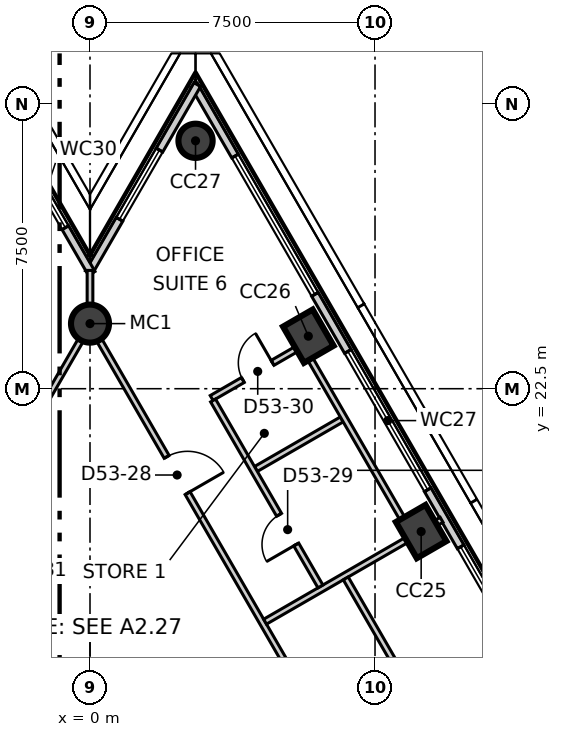
"""IFC4 building model, lengths in metres.
Left out: names, types, materials, properties, quantities, classifications, styles, units other than length and angle.
Written with IfcOpenShell. Run it as: python <this file> out.ifc"""

import sys

from ifc_helpers import new_model, si_unit, direction, frame, frame_2d, origin, origin_2d, place, context, subcontext, project, spatial, rectangle, circle, extrude, element, fill, save


model = new_model("IFC4")
c1 = context("Model", 3, precision=1e-05, world=origin(), true_north=direction((0.0, 1.0)))
c2 = subcontext(c1, "Body", "Model", "MODEL_VIEW")
j1 = project(units=[si_unit("LENGTHUNIT", "METRE"), si_unit("PLANEANGLEUNIT", "RADIAN")], contexts=[c1])
p1 = place(None, origin())
s1 = spatial("IfcSite", under=j1, at=p1, CompositionType="ELEMENT")
p2 = place(p1, origin())
s2 = spatial("IfcBuilding", under=s1, at=p2, CompositionType="ELEMENT")
p3 = place(p2, frame((0.0, 0.0, 227.3)))
s3 = spatial("IfcBuildingStorey", under=s2, at=p3, CompositionType="ELEMENT", Elevation=227.3)
for number, where, z_axis, x_axis in (
    (1, (8.714, 18.741, -0.3), (0.0, 0.0, 1.0), (-0.5, 0.866, 0.0)),
    (2, (5.745, 23.882, -0.3), (0.0, 0.0, 1.0), (-0.5, 0.866, 0.0)),
):
    element("IfcColumn", number, at=place(p3, frame(where, z_axis=z_axis, x_axis=x_axis)), inside=s3, PredefinedType="COLUMN", context=c2, shape_type="SweptSolid", body=[
        extrude(rectangle(XDim=1.1, YDim=0.9, at=origin_2d()), origin(), (0.0, 0.0, 1.0), 4.0),
    ])
p4 = place(p3, frame((2.777, 29.023, -0.3), z_axis=(0.0, 0.0, 1.0), x_axis=(-0.5, 0.866025403784, 0.0)))
e3 = element("IfcColumn", 3, at=p4, inside=s3, PredefinedType="COLUMN", context=c2, shape_type="SweptSolid", body=[
    extrude(circle(Radius=0.45, at=origin_2d()), origin(), (0.0, 0.0, 1.0), 4.0),
])
p5 = place(p3, frame((0.0, 24.213, -0.3), z_axis=(0.0, 0.0, 1.0), x_axis=(1.0, 0.0, 0.0)))
e4 = element("IfcColumn", 4, at=p5, inside=s3, PredefinedType="COLUMN", context=c2, shape_type="SweptSolid", body=[
    extrude(circle(Radius=0.5, at=origin_2d()), origin(), (0.0, 0.0, 1.0), 4.0),
])
p6 = place(p3, frame((27.782, -12.884, 0.0), z_axis=(0.0, 0.0, 1.0), x_axis=(-0.500023345841, 0.866011924637, 0.0)))
e5 = element("IfcWall", 5, at=p6, inside=s3, PredefinedType="ELEMENTEDWALL", context=c2, shape_type="SweptSolid", body=[
    extrude(rectangle(XDim=50.078, YDim=0.2, at=frame_2d((25.039, 0.0))), origin(), (0.0, 0.0, 1.0), 3.7),
])
p7 = place(p6, frame((2.171, 0.0, 0.9)))
e6 = element("IfcOpeningElement", 6, at=p7, cuts=e5, PredefinedType="OPENING", context=c2, shape_type="SweptSolid", body=[
    extrude(rectangle(XDim=4.2, YDim=2.5, at=frame_2d((2.1, 1.25))), frame((0.0, 0.11, 0.0), z_axis=(0.0, -1.0, 0.0), x_axis=(1.0, 0.0, 0.0)), (0.0, 0.0, 1.0), 0.22),
])
p8 = place(p6, frame((8.108, 0.0, 0.9)))
e7 = element("IfcOpeningElement", 7, at=p8, cuts=e5, PredefinedType="OPENING", context=c2, shape_type="SweptSolid", body=[
    extrude(rectangle(XDim=4.2, YDim=2.5, at=frame_2d((2.1, 1.25))), frame((0.0, 0.11, 0.0), z_axis=(0.0, -1.0, 0.0), x_axis=(1.0, 0.0, 0.0)), (0.0, 0.0, 1.0), 0.22),
])
p9 = place(p6, frame((14.044, 0.0, 0.9)))
e8 = element("IfcOpeningElement", 8, at=p9, cuts=e5, PredefinedType="OPENING", context=c2, shape_type="SweptSolid", body=[
    extrude(rectangle(XDim=4.2, YDim=2.5, at=frame_2d((2.1, 1.25))), frame((0.0, 0.11, 0.0), z_axis=(0.0, -1.0, 0.0), x_axis=(1.0, 0.0, 0.0)), (0.0, 0.0, 1.0), 0.22),
])
p10 = place(p6, frame((19.981, 0.0, 0.9)))
e9 = element("IfcOpeningElement", 9, at=p10, cuts=e5, PredefinedType="OPENING", context=c2, shape_type="SweptSolid", body=[
    extrude(rectangle(XDim=4.2, YDim=2.5, at=frame_2d((2.1, 1.25))), frame((0.0, 0.11, 0.0), z_axis=(0.0, -1.0, 0.0), x_axis=(1.0, 0.0, 0.0)), (0.0, 0.0, 1.0), 0.22),
])
p11 = place(p6, frame((25.917, 0.0, 0.9)))
e10 = element("IfcOpeningElement", 10, at=p11, cuts=e5, PredefinedType="OPENING", context=c2, shape_type="SweptSolid", body=[
    extrude(rectangle(XDim=4.2, YDim=2.5, at=frame_2d((2.1, 1.25))), frame((0.0, 0.11, 0.0), z_axis=(0.0, -1.0, 0.0), x_axis=(1.0, 0.0, 0.0)), (0.0, 0.0, 1.0), 0.22),
])
p12 = place(p6, frame((31.854, 0.0, 0.9)))
e11 = element("IfcOpeningElement", 11, at=p12, cuts=e5, PredefinedType="OPENING", context=c2, shape_type="SweptSolid", body=[
    extrude(rectangle(XDim=4.2, YDim=2.5, at=frame_2d((2.1, 1.25))), frame((0.0, 0.11, 0.0), z_axis=(0.0, -1.0, 0.0), x_axis=(1.0, 0.0, 0.0)), (0.0, 0.0, 1.0), 0.22),
])
p13 = place(p6, frame((37.79, 0.0, 0.9)))
e12 = element("IfcOpeningElement", 12, at=p13, cuts=e5, PredefinedType="OPENING", context=c2, shape_type="SweptSolid", body=[
    extrude(rectangle(XDim=4.2, YDim=2.5, at=frame_2d((2.1, 1.25))), frame((0.0, 0.11, 0.0), z_axis=(0.0, -1.0, 0.0), x_axis=(1.0, 0.0, 0.0)), (0.0, 0.0, 1.0), 0.22),
])
p14 = place(p6, frame((43.727, 0.0, 0.9)))
e13 = element("IfcOpeningElement", 13, at=p14, cuts=e5, PredefinedType="OPENING", context=c2, shape_type="SweptSolid", body=[
    extrude(rectangle(XDim=4.2, YDim=2.5, at=frame_2d((2.1, 1.25))), frame((0.0, 0.11, 0.0), z_axis=(0.0, -1.0, 0.0), x_axis=(1.0, 0.0, 0.0)), (0.0, 0.0, 1.0), 0.22),
])
p15 = place(p3, frame((2.822, 30.501, 0.0), z_axis=(0.0, 0.0, 1.0), x_axis=(-0.49995298266, -0.866052547557, 0.0)))
e14 = element("IfcWall", 14, at=p15, inside=s3, PredefinedType="ELEMENTEDWALL", context=c2, shape_type="SweptSolid", body=[
    extrude(rectangle(XDim=5.714, YDim=0.2, at=frame_2d((2.857, 0.0))), origin(), (0.0, 0.0, 1.0), 3.7),
])
p16 = place(p15, frame((1.99, 0.0, 0.9)))
e15 = element("IfcOpeningElement", 15, at=p16, cuts=e14, PredefinedType="OPENING", context=c2, shape_type="SweptSolid", body=[
    extrude(rectangle(XDim=2.1, YDim=2.5, at=frame_2d((1.05, 1.25))), frame((0.0, 0.11, 0.0), z_axis=(0.0, -1.0, 0.0), x_axis=(1.0, 0.0, 0.0)), (0.0, 0.0, 1.0), 0.22),
])
p17 = place(p3, frame((0.045, 25.535, 0.0), z_axis=(0.0, 0.0, 1.0), x_axis=(-0.49995298266, 0.866052547557, 0.0)))
e16 = element("IfcWall", 16, at=p17, inside=s3, PredefinedType="ELEMENTEDWALL", context=c2, shape_type="SweptSolid", body=[
    extrude(rectangle(XDim=5.714, YDim=0.2, at=frame_2d((2.857, 0.0))), origin(), (0.0, 0.0, 1.0), 3.7),
])
p18 = place(p17, frame((1.39, 0.0, 0.9)))
e17 = element("IfcOpeningElement", 17, at=p18, cuts=e16, PredefinedType="OPENING", context=c2, shape_type="SweptSolid", body=[
    extrude(rectangle(XDim=2.1, YDim=2.5, at=frame_2d((1.05, 1.25))), frame((0.0, 0.11, 0.0), z_axis=(0.0, -1.0, 0.0), x_axis=(1.0, 0.0, 0.0)), (0.0, 0.0, 1.0), 0.22),
])
p19 = place(p3, frame((-20.882, -11.969, 0.0), z_axis=(0.0, 0.0, 1.0), x_axis=(0.499998738735, 0.866026131975, 0.0)))
e18 = element("IfcWall", 18, at=p19, inside=s3, PredefinedType="PARTITIONING", context=c2, shape_type="SweptSolid", body=[
    extrude(rectangle(XDim=41.764, YDim=0.15, at=frame_2d((20.882, 0.0))), origin(), (0.0, 0.0, 1.0), 3.7),
])
p20 = place(p19, frame((33.714, 0.0, 0.0)))
e19 = element("IfcOpeningElement", 19, at=p20, cuts=e18, PredefinedType="OPENING", context=c2, shape_type="SweptSolid", body=[
    extrude(rectangle(XDim=1.1, YDim=2.1, at=frame_2d((0.55, 1.05))), frame((0.0, 0.085, 0.0), z_axis=(0.0, -1.0, 0.0), x_axis=(1.0, 0.0, 0.0)), (0.0, 0.0, 1.0), 0.17),
])
p21 = place(p19, frame((23.293, 0.0, 0.0)))
e20 = element("IfcOpeningElement", 20, at=p21, cuts=e18, PredefinedType="OPENING", context=c2, shape_type="SweptSolid", body=[
    extrude(rectangle(XDim=1.0, YDim=2.1, at=frame_2d((0.5, 1.05))), frame((0.0, 0.085, 0.0), z_axis=(0.0, -1.0, 0.0), x_axis=(1.0, 0.0, 0.0)), (0.0, 0.0, 1.0), 0.17),
])
p22 = place(p19, frame((13.356, 0.0, 0.0)))
e21 = element("IfcOpeningElement", 21, at=p22, cuts=e18, PredefinedType="OPENING", context=c2, shape_type="SweptSolid", body=[
    extrude(rectangle(XDim=1.1, YDim=2.1, at=frame_2d((0.55, 1.05))), frame((0.0, 0.085, 0.0), z_axis=(0.0, -1.0, 0.0), x_axis=(1.0, 0.0, 0.0)), (0.0, 0.0, 1.0), 0.17),
])
p23 = place(p19, frame((18.556, 0.0, 0.0)))
e22 = element("IfcOpeningElement", 22, at=p23, cuts=e18, PredefinedType="OPENING", context=c2, shape_type="SweptSolid", body=[
    extrude(rectangle(XDim=0.9, YDim=2.1, at=frame_2d((0.45, 1.05))), frame((0.0, 0.085, 0.0), z_axis=(0.0, -1.0, 0.0), x_axis=(1.0, 0.0, 0.0)), (0.0, 0.0, 1.0), 0.17),
])
p24 = place(p19, frame((15.556, 0.0, 0.0)))
e23 = element("IfcOpeningElement", 23, at=p24, cuts=e18, PredefinedType="OPENING", context=c2, shape_type="SweptSolid", body=[
    extrude(rectangle(XDim=0.9, YDim=2.1, at=frame_2d((0.45, 1.05))), frame((0.0, 0.085, 0.0), z_axis=(0.0, -1.0, 0.0), x_axis=(1.0, 0.0, 0.0)), (0.0, 0.0, 1.0), 0.17),
])
p25 = place(p19, frame((3.883, 0.0, 0.0)))
e24 = element("IfcOpeningElement", 24, at=p25, cuts=e18, PredefinedType="OPENING", context=c2, shape_type="SweptSolid", body=[
    extrude(rectangle(XDim=1.1, YDim=2.1, at=frame_2d((0.55, 1.05))), frame((0.0, 0.085, 0.0), z_axis=(0.0, -1.0, 0.0), x_axis=(1.0, 0.0, 0.0)), (0.0, 0.0, 1.0), 0.17),
])
p26 = place(p3, frame((0.0, 24.35, 0.0), z_axis=(0.0, 0.0, 1.0), x_axis=(0.0, 1.0, 0.0)))
e25 = element("IfcWall", 25, at=p26, inside=s3, PredefinedType="PARTITIONING", context=c2, shape_type="SweptSolid", body=[
    extrude(rectangle(XDim=1.263, YDim=0.15, at=frame_2d((0.631, 0.0))), origin(), (0.0, 0.0, 1.0), 3.7),
])
p27 = place(p3, frame((0.075, 24.07, 0.0), z_axis=(0.0, 0.0, 1.0), x_axis=(0.49999939571, -0.866025752671, 0.0)))
e26 = element("IfcWall", 26, at=p27, inside=s3, PredefinedType="PARTITIONING", context=c2, shape_type="SweptSolid", body=[
    extrude(rectangle(XDim=41.614, YDim=0.15, at=frame_2d((20.807, 0.0))), origin(), (0.0, 0.0, 1.0), 3.7),
])
p28 = place(p27, frame((36.714, 0.0, 0.0)))
e27 = element("IfcOpeningElement", 27, at=p28, cuts=e26, PredefinedType="OPENING", context=c2, shape_type="SweptSolid", body=[
    extrude(rectangle(XDim=1.1, YDim=2.1, at=frame_2d((0.55, 1.05))), frame((0.0, 0.085, 0.0), z_axis=(0.0, -1.0, 0.0), x_axis=(1.0, 0.0, 0.0)), (0.0, 0.0, 1.0), 0.17),
])
p29 = place(p27, frame((21.831, 0.0, 0.0)))
e28 = element("IfcOpeningElement", 28, at=p29, cuts=e26, PredefinedType="OPENING", context=c2, shape_type="SweptSolid", body=[
    extrude(rectangle(XDim=1.1, YDim=2.1, at=frame_2d((0.55, 1.05))), frame((0.0, 0.085, 0.0), z_axis=(0.0, -1.0, 0.0), x_axis=(1.0, 0.0, 0.0)), (0.0, 0.0, 1.0), 0.17),
])
p30 = place(p27, frame((30.631, 0.0, 0.0)))
e29 = element("IfcOpeningElement", 29, at=p30, cuts=e26, PredefinedType="OPENING", context=c2, shape_type="SweptSolid", body=[
    extrude(rectangle(XDim=0.9, YDim=2.1, at=frame_2d((0.45, 1.05))), frame((0.0, 0.085, 0.0), z_axis=(0.0, -1.0, 0.0), x_axis=(1.0, 0.0, 0.0)), (0.0, 0.0, 1.0), 0.17),
])
p31 = place(p27, frame((27.431, 0.0, 0.0)))
e30 = element("IfcOpeningElement", 30, at=p31, cuts=e26, PredefinedType="OPENING", context=c2, shape_type="SweptSolid", body=[
    extrude(rectangle(XDim=0.9, YDim=2.1, at=frame_2d((0.45, 1.05))), frame((0.0, 0.085, 0.0), z_axis=(0.0, -1.0, 0.0), x_axis=(1.0, 0.0, 0.0)), (0.0, 0.0, 1.0), 0.17),
])
p32 = place(p27, frame((24.631, 0.0, 0.0)))
e31 = element("IfcOpeningElement", 31, at=p32, cuts=e26, PredefinedType="OPENING", context=c2, shape_type="SweptSolid", body=[
    extrude(rectangle(XDim=1.0, YDim=2.1, at=frame_2d((0.5, 1.05))), frame((0.0, 0.085, 0.0), z_axis=(0.0, -1.0, 0.0), x_axis=(1.0, 0.0, 0.0)), (0.0, 0.0, 1.0), 0.17),
])
p33 = place(p27, frame((14.358, 0.0, 0.0)))
e32 = element("IfcOpeningElement", 32, at=p33, cuts=e26, PredefinedType="OPENING", context=c2, shape_type="SweptSolid", body=[
    extrude(rectangle(XDim=1.1, YDim=2.1, at=frame_2d((0.55, 1.05))), frame((0.0, 0.085, 0.0), z_axis=(0.0, -1.0, 0.0), x_axis=(1.0, 0.0, 0.0)), (0.0, 0.0, 1.0), 0.17),
])
p34 = place(p27, frame((3.885, 0.0, 0.0)))
e33 = element("IfcOpeningElement", 33, at=p34, cuts=e26, PredefinedType="OPENING", context=c2, shape_type="SweptSolid", body=[
    extrude(rectangle(XDim=1.1, YDim=2.1, at=frame_2d((0.55, 1.05))), frame((0.0, 0.085, 0.0), z_axis=(0.0, -1.0, 0.0), x_axis=(1.0, 0.0, 0.0)), (0.0, 0.0, 1.0), 0.17),
])
p35 = place(p3, frame((4.607, 16.37, 0.0), z_axis=(0.0, 0.0, 1.0), x_axis=(0.866052151752, 0.499953668299, 0.0)))
e34 = element("IfcWall", 34, at=p35, inside=s3, PredefinedType="PARTITIONING", context=c2, shape_type="SweptSolid", body=[
    extrude(rectangle(XDim=5.362, YDim=0.15, at=frame_2d((2.681, 0.0))), origin(), (0.0, 0.0, 1.0), 3.7),
])
p36 = place(p3, frame((4.366, 20.388, 0.0), z_axis=(0.0, 0.0, 1.0), x_axis=(0.8660749285, 0.499914210863, 0.0)))
e35 = element("IfcWall", 35, at=p36, inside=s3, PredefinedType="PARTITIONING", context=c2, shape_type="SweptSolid", body=[
    extrude(rectangle(XDim=2.608, YDim=0.15, at=frame_2d((1.304, 0.0))), origin(), (0.0, 0.0, 1.0), 3.7),
])
p37 = place(p3, frame((5.59, 23.635, 0.0), z_axis=(0.0, 0.0, 1.0), x_axis=(0.500037442639, -0.866003785188, 0.0)))
e36 = element("IfcWall", 36, at=p37, inside=s3, PredefinedType="PARTITIONING", context=c2, shape_type="SweptSolid", body=[
    extrude(rectangle(XDim=5.725, YDim=0.15, at=frame_2d((2.863, 0.0))), origin(), (0.0, 0.0, 1.0), 2.95),
])
p38 = place(p3, frame((3.201, 22.255, 0.0), z_axis=(0.0, 0.0, 1.0), x_axis=(0.865978018799, 0.500082064223, 0.0)))
e37 = element("IfcWall", 37, at=p38, inside=s3, PredefinedType="PARTITIONING", context=c2, shape_type="SweptSolid", body=[
    extrude(rectangle(XDim=2.684, YDim=0.15, at=frame_2d((1.342, 0.0))), origin(), (0.0, 0.0, 1.0), 3.7),
])
p39 = place(p38, frame((0.95, 0.0, 0.0)))
e38 = element("IfcOpeningElement", 38, at=p39, cuts=e37, PredefinedType="OPENING", context=c2, shape_type="SweptSolid", body=[
    extrude(rectangle(XDim=0.9, YDim=2.1, at=frame_2d((0.45, 1.05))), frame((0.0, 0.085, 0.0), z_axis=(0.0, -1.0, 0.0), x_axis=(1.0, 0.0, 0.0)), (0.0, 0.0, 1.0), 0.17),
])
p40 = place(p3, frame((3.239, 22.19, 0.0), z_axis=(0.0, 0.0, 1.0), x_axis=(0.500010476433, -0.866019355129, 0.0)))
e39 = element("IfcWall", 39, at=p40, inside=s3, PredefinedType="PARTITIONING", context=c2, shape_type="SweptSolid", body=[
    extrude(rectangle(XDim=5.65, YDim=0.15, at=frame_2d((2.825, 0.0))), origin(), (0.0, 0.0, 1.0), 3.7),
])
p41 = place(p40, frame((3.474, 0.0, 0.0)))
e40 = element("IfcOpeningElement", 40, at=p41, cuts=e39, PredefinedType="OPENING", context=c2, shape_type="SweptSolid", body=[
    extrude(rectangle(XDim=0.9, YDim=2.1, at=frame_2d((0.45, 1.05))), frame((0.0, 0.085, 0.0), z_axis=(0.0, -1.0, 0.0), x_axis=(1.0, 0.0, 0.0)), (0.0, 0.0, 1.0), 0.17),
])
p42 = place(p3, frame((6.73, 17.509, 0.0), z_axis=(0.0, 0.0, 1.0), x_axis=(0.500011469263, -0.866018781901, 0.0)))
e41 = element("IfcWall", 41, at=p42, inside=s3, PredefinedType="PARTITIONING", context=c2, shape_type="SweptSolid", body=[
    extrude(rectangle(XDim=11.724, YDim=0.15, at=frame_2d((5.862, 0.0))), origin(), (0.0, 0.0, 1.0), 3.7),
])
p43 = place(p42, frame((5.349, 0.0, 0.0)))
e42 = element("IfcOpeningElement", 42, at=p43, cuts=e41, PredefinedType="OPENING", context=c2, shape_type="SweptSolid", body=[
    extrude(rectangle(XDim=1.0, YDim=2.1, at=frame_2d((0.5, 1.05))), frame((0.0, 0.085, 0.0), z_axis=(0.0, -1.0, 0.0), x_axis=(1.0, 0.0, 0.0)), (0.0, 0.0, 1.0), 0.17),
])
p44 = place(p12, origin())
e43 = element("IfcWindow", 43, at=p44, inside=s3, PartitioningType="SINGLE_PANEL", PredefinedType="WINDOW", context=c2, shape_type="SweptSolid", body=[
    extrude(rectangle(XDim=4.2, YDim=2.5, at=frame_2d((2.1, 1.25))), frame((0.0, 0.03, 0.0), z_axis=(0.0, -1.0, 0.0), x_axis=(1.0, 0.0, 0.0)), (0.0, 0.0, 1.0), 0.06),
])
fill(e11, e43)
p45 = place(p13, origin())
e44 = element("IfcWindow", 44, at=p45, inside=s3, PartitioningType="SINGLE_PANEL", PredefinedType="WINDOW", context=c2, shape_type="SweptSolid", body=[
    extrude(rectangle(XDim=4.2, YDim=2.5, at=frame_2d((2.1, 1.25))), frame((0.0, 0.03, 0.0), z_axis=(0.0, -1.0, 0.0), x_axis=(1.0, 0.0, 0.0)), (0.0, 0.0, 1.0), 0.06),
])
fill(e12, e44)
p46 = place(p14, origin())
e45 = element("IfcWindow", 45, at=p46, inside=s3, PartitioningType="SINGLE_PANEL", PredefinedType="WINDOW", context=c2, shape_type="SweptSolid", body=[
    extrude(rectangle(XDim=4.2, YDim=2.5, at=frame_2d((2.1, 1.25))), frame((0.0, 0.03, 0.0), z_axis=(0.0, -1.0, 0.0), x_axis=(1.0, 0.0, 0.0)), (0.0, 0.0, 1.0), 0.06),
])
fill(e13, e45)
p47 = place(p16, origin())
e46 = element("IfcWindow", 46, at=p47, inside=s3, PartitioningType="SINGLE_PANEL", PredefinedType="WINDOW", context=c2, shape_type="SweptSolid", body=[
    extrude(rectangle(XDim=2.1, YDim=2.5, at=frame_2d((1.05, 1.25))), frame((0.0, 0.03, 0.0), z_axis=(0.0, -1.0, 0.0), x_axis=(1.0, 0.0, 0.0)), (0.0, 0.0, 1.0), 0.06),
])
fill(e15, e46)
p48 = place(p18, origin())
e47 = element("IfcWindow", 47, at=p48, inside=s3, PartitioningType="SINGLE_PANEL", PredefinedType="WINDOW", context=c2, shape_type="SweptSolid", body=[
    extrude(rectangle(XDim=2.1, YDim=2.5, at=frame_2d((1.05, 1.25))), frame((0.0, 0.03, 0.0), z_axis=(0.0, -1.0, 0.0), x_axis=(1.0, 0.0, 0.0)), (0.0, 0.0, 1.0), 0.06),
])
fill(e17, e47)
p49 = place(p34, origin())
e48 = element("IfcDoor", 48, at=p49, inside=s3, OperationType="SINGLE_SWING_LEFT", PredefinedType="DOOR", context=c2, shape_type="SweptSolid", body=[
    extrude(rectangle(XDim=1.1, YDim=2.1, at=frame_2d((0.55, 1.05))), frame((0.0, 0.025, 0.0), z_axis=(0.0, -1.0, 0.0), x_axis=(1.0, 0.0, 0.0)), (0.0, 0.0, 1.0), 0.05),
])
fill(e33, e48)
p50 = place(p41, origin())
e49 = element("IfcDoor", 49, at=p50, inside=s3, OperationType="SINGLE_SWING_RIGHT", PredefinedType="DOOR", context=c2, shape_type="SweptSolid", body=[
    extrude(rectangle(XDim=0.9, YDim=2.1, at=frame_2d((0.45, 1.05))), frame((0.0, 0.025, 0.0), z_axis=(0.0, -1.0, 0.0), x_axis=(1.0, 0.0, 0.0)), (0.0, 0.0, 1.0), 0.05),
])
fill(e40, e49)
p51 = place(p39, origin())
e50 = element("IfcDoor", 50, at=p51, inside=s3, OperationType="SINGLE_SWING_LEFT", PredefinedType="DOOR", context=c2, shape_type="SweptSolid", body=[
    extrude(rectangle(XDim=0.9, YDim=2.1, at=frame_2d((0.45, 1.05))), frame((0.0, 0.025, 0.0), z_axis=(0.0, -1.0, 0.0), x_axis=(1.0, 0.0, 0.0)), (0.0, 0.0, 1.0), 0.05),
])
fill(e38, e50)
save(model, sys.argv[1])
